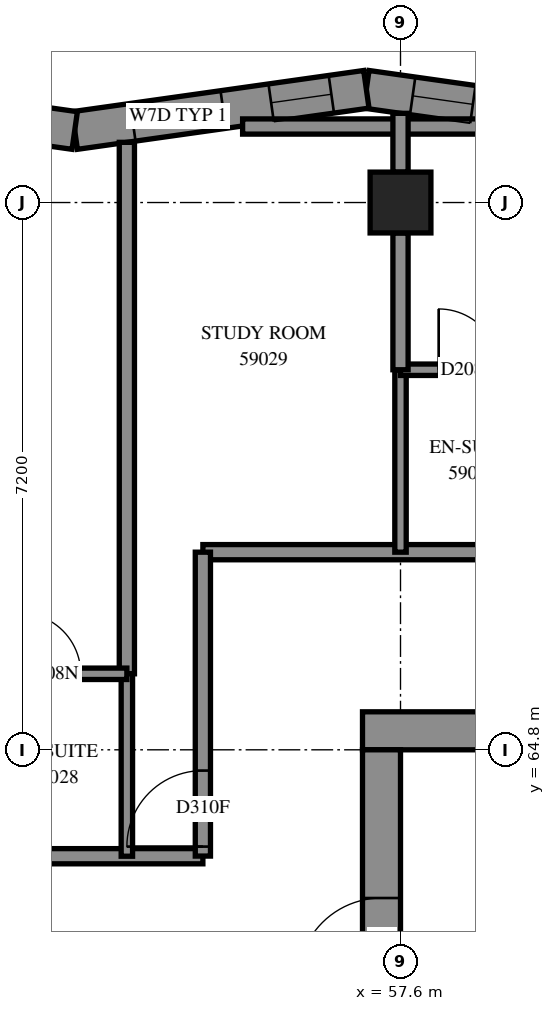
"""IFC4 building model, lengths in metres.
Left out: names, types, materials, properties, quantities, classifications, styles, units other than length and angle.
Written with IfcOpenShell. Run it as: python <this file> out.ifc"""

import sys

from ifc_helpers import new_model, si_unit, direction, frame, frame_2d, origin, origin_2d, place, context, subcontext, project, spatial, polyline, rectangle, outline, extrude, element, fill, save


model = new_model("IFC4")
c1 = context("Model", 3, precision=1e-05, world=origin(), true_north=direction((0.0, 1.0)))
c2 = subcontext(c1, "Body", "Model", "MODEL_VIEW")
j1 = project(units=[si_unit("LENGTHUNIT", "METRE"), si_unit("PLANEANGLEUNIT", "RADIAN")], contexts=[c1])
p1 = place(None, origin())
s1 = spatial("IfcSite", under=j1, at=p1, CompositionType="ELEMENT")
p2 = place(p1, origin())
s2 = spatial("IfcBuilding", under=s1, at=p2, CompositionType="ELEMENT")
p3 = place(p2, frame((0.0, 0.0, 216.8)))
s3 = spatial("IfcBuildingStorey", under=s2, at=p3, CompositionType="ELEMENT", Elevation=216.8)
p4 = place(p3, frame((57.6, 72.0, 0.0), z_axis=(0.0, 0.0, 1.0), x_axis=(1.0, 0.0, 0.0)))
e1 = element("IfcColumn", 1, at=p4, inside=s3, PredefinedType="COLUMN", context=c2, shape_type="SweptSolid", body=[
    extrude(rectangle(XDim=0.8, YDim=0.8, at=origin_2d()), origin(), (0.0, 0.0, 1.0), 3.1),
])
p5 = place(p3, frame((57.1, 65.05, -0.3), z_axis=(0.0, 0.0, 1.0), x_axis=(1.0, 0.0, 0.0)))
e2 = element("IfcWall", 2, at=p5, inside=s3, PredefinedType="SHEAR", context=c2, shape_type="SweptSolid", body=[
    extrude(rectangle(XDim=15.4, YDim=0.5, at=frame_2d((7.7, 0.0))), origin(), (0.0, 0.0, 1.0), 2.7),
])
p6 = place(p5, frame((10.5, 0.0, 0.3)))
e3 = element("IfcOpeningElement", 3, at=p6, cuts=e2, PredefinedType="OPENING", context=c2, shape_type="SweptSolid", body=[
    extrude(rectangle(XDim=0.8, YDim=2.1, at=frame_2d((0.4, 1.05))), frame((0.0, 0.26, 0.0), z_axis=(0.0, -1.0, 0.0), x_axis=(1.0, 0.0, 0.0)), (0.0, 0.0, 1.0), 0.52),
])
p7 = place(p3, frame((57.35, 50.4, -0.3), z_axis=(0.0, 0.0, 1.0), x_axis=(0.0, 1.0, 0.0)))
e4 = element("IfcWall", 4, at=p7, inside=s3, PredefinedType="SHEAR", context=c2, shape_type="SweptSolid", body=[
    extrude(rectangle(XDim=14.4, YDim=0.5, at=frame_2d((7.2, 0.0))), origin(), (0.0, 0.0, 1.0), 2.7),
])
p8 = place(p7, frame((4.55, 0.0, 0.3)))
e5 = element("IfcOpeningElement", 5, at=p8, cuts=e4, PredefinedType="OPENING", context=c2, shape_type="SweptSolid", body=[
    extrude(rectangle(XDim=1.1, YDim=2.1, at=frame_2d((0.55, 1.05))), frame((0.0, 0.26, 0.0), z_axis=(0.0, -1.0, 0.0), x_axis=(1.0, 0.0, 0.0)), (0.0, 0.0, 1.0), 0.52),
])
p9 = place(p7, frame((11.35, 0.0, 0.3)))
e6 = element("IfcOpeningElement", 6, at=p9, cuts=e4, PredefinedType="OPENING", context=c2, shape_type="SweptSolid", body=[
    extrude(rectangle(XDim=1.1, YDim=2.1, at=frame_2d((0.55, 1.05))), frame((0.0, 0.26, 0.0), z_axis=(0.0, -1.0, 0.0), x_axis=(1.0, 0.0, 0.0)), (0.0, 0.0, 1.0), 0.52),
])
p10 = place(p3, frame((60.987, 72.948, 0.0), z_axis=(0.0, 0.0, 1.0), x_axis=(-0.9901681853, 0.1398819675, 0.0)))
e7 = element("IfcWall", 7, at=p10, inside=s3, PredefinedType="SOLIDWALL", context=c2, shape_type="SweptSolid", body=[
    extrude(outline(polyline([(0.035, -0.25), (3.91, -0.25), (3.839, 0.25), (-0.035, 0.25), (0.035, -0.25)])), origin(), (0.0, 0.0, 1.0), 3.1),
])
p11 = place(p10, frame((0.41, 0.0, 0.45)))
e8 = element("IfcOpeningElement", 8, at=p11, cuts=e7, PredefinedType="OPENING", context=c2, shape_type="SweptSolid", body=[
    extrude(rectangle(XDim=1.3, YDim=2.5, at=frame_2d((0.65, 1.25))), frame((0.0, 0.26, 0.0), z_axis=(0.0, -1.0, 0.0), x_axis=(1.0, 0.0, 0.0)), (0.0, 0.0, 1.0), 0.52),
])
p12 = place(p10, frame((2.459, 0.0, 0.45)))
e9 = element("IfcOpeningElement", 9, at=p12, cuts=e7, PredefinedType="OPENING", context=c2, shape_type="SweptSolid", body=[
    extrude(rectangle(XDim=0.8, YDim=2.5, at=frame_2d((0.4, 1.25))), frame((0.0, 0.26, 0.0), z_axis=(0.0, -1.0, 0.0), x_axis=(1.0, 0.0, 0.0)), (0.0, 0.0, 1.0), 0.52),
])
p13 = place(p3, frame((57.151, 73.49, 0.0), z_axis=(0.0, 0.0, 1.0), x_axis=(-0.9901676803, -0.1398855422, 0.0)))
e10 = element("IfcWall", 10, at=p13, inside=s3, PredefinedType="SOLIDWALL", context=c2, shape_type="SweptSolid", body=[
    extrude(outline(polyline([(-0.035, -0.25), (3.839, -0.25), (3.91, 0.25), (0.035, 0.25), (-0.035, -0.25)])), origin(), (0.0, 0.0, 1.0), 3.1),
])
p14 = place(p13, frame((0.465, 0.0, 0.45)))
e11 = element("IfcOpeningElement", 11, at=p14, cuts=e10, PredefinedType="OPENING", context=c2, shape_type="SweptSolid", body=[
    extrude(rectangle(XDim=0.8, YDim=2.5, at=frame_2d((0.4, 1.25))), frame((0.0, 0.26, 0.0), z_axis=(0.0, -1.0, 0.0), x_axis=(1.0, 0.0, 0.0)), (0.0, 0.0, 1.0), 0.52),
])
p15 = place(p13, frame((1.902, 0.0, 0.5)))
e12 = element("IfcOpeningElement", 12, at=p15, cuts=e10, PredefinedType="OPENING", context=c2, shape_type="SweptSolid", body=[
    extrude(rectangle(XDim=1.2, YDim=2.45, at=frame_2d((0.6, 1.225))), frame((0.0, 0.26, 0.0), z_axis=(0.0, -1.0, 0.0), x_axis=(1.0, 0.0, 0.0)), (0.0, 0.0, 1.0), 0.52),
])
p16 = place(p3, frame((53.314, 72.948, 0.0), z_axis=(0.0, 0.0, 1.0), x_axis=(-0.9901681853, 0.1398819675, 0.0)))
e13 = element("IfcWall", 13, at=p16, inside=s3, PredefinedType="SOLIDWALL", context=c2, shape_type="SweptSolid", body=[
    extrude(outline(polyline([(0.035, -0.25), (3.91, -0.25), (3.839, 0.25), (-0.035, 0.25), (0.035, -0.25)])), origin(), (0.0, 0.0, 1.0), 3.1),
])
p17 = place(p16, frame((0.872, 0.0, 0.45)))
e14 = element("IfcOpeningElement", 14, at=p17, cuts=e13, PredefinedType="OPENING", context=c2, shape_type="SweptSolid", body=[
    extrude(rectangle(XDim=1.2, YDim=2.5, at=frame_2d((0.6, 1.25))), frame((0.0, 0.26, 0.0), z_axis=(0.0, -1.0, 0.0), x_axis=(1.0, 0.0, 0.0)), (0.0, 0.0, 1.0), 0.52),
])
p18 = place(p3, frame((55.0, 67.4, 0.0), z_axis=(0.0, 0.0, 1.0), x_axis=(1.0, 0.0, 0.0)))
e15 = element("IfcWall", 15, at=p18, inside=s3, PredefinedType="PARTITIONING", context=c2, shape_type="SweptSolid", body=[
    extrude(rectangle(XDim=19.6, YDim=0.2, at=frame_2d((9.8, 0.0))), origin(), (0.0, 0.0, 1.0), 3.1),
])
p19 = place(p18, frame((4.9, 0.0, 0.0)))
e16 = element("IfcOpeningElement", 16, at=p19, cuts=e15, PredefinedType="OPENING", context=c2, shape_type="SweptSolid", body=[
    extrude(rectangle(XDim=0.9, YDim=2.1, at=frame_2d((0.45, 1.05))), frame((0.0, 0.11, 0.0), z_axis=(0.0, -1.0, 0.0), x_axis=(1.0, 0.0, 0.0)), (0.0, 0.0, 1.0), 0.22),
])
p20 = place(p18, frame((8.539, 0.0, 0.0)))
e17 = element("IfcOpeningElement", 17, at=p20, cuts=e15, PredefinedType="OPENING", context=c2, shape_type="SweptSolid", body=[
    extrude(rectangle(XDim=0.9, YDim=2.1, at=frame_2d((0.45, 1.05))), frame((0.0, 0.11, 0.0), z_axis=(0.0, -1.0, 0.0), x_axis=(1.0, 0.0, 0.0)), (0.0, 0.0, 1.0), 0.22),
])
p21 = place(p18, frame((13.8, 0.0, 0.0)))
e18 = element("IfcOpeningElement", 18, at=p21, cuts=e15, PredefinedType="OPENING", context=c2, shape_type="SweptSolid", body=[
    extrude(rectangle(XDim=0.9, YDim=2.1, at=frame_2d((0.45, 1.05))), frame((0.0, 0.11, 0.0), z_axis=(0.0, -1.0, 0.0), x_axis=(1.0, 0.0, 0.0)), (0.0, 0.0, 1.0), 0.22),
])
p22 = place(p3, frame((40.602, 63.4, 0.0), z_axis=(0.0, 0.0, 1.0), x_axis=(1.0, 0.0, 0.0)))
e19 = element("IfcWall", 19, at=p22, inside=s3, PredefinedType="PARTITIONING", context=c2, shape_type="SweptSolid", body=[
    extrude(rectangle(XDim=14.398, YDim=0.2, at=frame_2d((7.199, 0.0))), origin(), (0.0, 0.0, 1.0), 3.1),
])
p23 = place(p22, frame((0.124, 0.0, 0.0)))
e20 = element("IfcOpeningElement", 20, at=p23, cuts=e19, PredefinedType="OPENING", context=c2, shape_type="SweptSolid", body=[
    extrude(rectangle(XDim=1.0, YDim=2.1, at=frame_2d((0.5, 1.05))), frame((0.0, 0.11, 0.0), z_axis=(0.0, -1.0, 0.0), x_axis=(1.0, 0.0, 0.0)), (0.0, 0.0, 1.0), 0.22),
])
p24 = place(p22, frame((6.46, 0.0, 0.0)))
e21 = element("IfcOpeningElement", 21, at=p24, cuts=e19, PredefinedType="OPENING", context=c2, shape_type="SweptSolid", body=[
    extrude(rectangle(XDim=1.0, YDim=2.1, at=frame_2d((0.5, 1.05))), frame((0.0, 0.11, 0.0), z_axis=(0.0, -1.0, 0.0), x_axis=(1.0, 0.0, 0.0)), (0.0, 0.0, 1.0), 0.22),
])
p25 = place(p22, frame((10.198, 0.0, 0.0)))
e22 = element("IfcOpeningElement", 22, at=p25, cuts=e19, PredefinedType="OPENING", context=c2, shape_type="SweptSolid", body=[
    extrude(rectangle(XDim=0.9, YDim=2.1, at=frame_2d((0.45, 1.05))), frame((0.0, 0.11, 0.0), z_axis=(0.0, -1.0, 0.0), x_axis=(1.0, 0.0, 0.0)), (0.0, 0.0, 1.0), 0.22),
])
p26 = place(p3, frame((54.0, 65.8, 0.0), z_axis=(0.0, 0.0, 1.0), x_axis=(0.0, 1.0, 0.0)))
e23 = element("IfcWall", 23, at=p26, inside=s3, PredefinedType="PARTITIONING", context=c2, shape_type="SweptSolid", body=[
    extrude(rectangle(XDim=6.992, YDim=0.2, at=frame_2d((3.496, 0.0))), origin(), (0.0, 0.0, 1.0), 3.1),
])
p27 = place(p3, frame((55.0, 63.402, 0.0), z_axis=(0.0, 0.0, 1.0), x_axis=(0.0, 1.0, 0.0)))
e24 = element("IfcWall", 24, at=p27, inside=s3, PredefinedType="PARTITIONING", context=c2, shape_type="SweptSolid", body=[
    extrude(rectangle(XDim=3.998, YDim=0.2, at=frame_2d((1.999, 0.0))), origin(), (0.0, 0.0, 1.0), 3.1),
])
p28 = place(p27, frame((0.125, 0.0, 0.0)))
e25 = element("IfcOpeningElement", 25, at=p28, cuts=e24, PredefinedType="OPENING", context=c2, shape_type="SweptSolid", body=[
    extrude(rectangle(XDim=1.0, YDim=2.1, at=frame_2d((0.5, 1.05))), frame((0.0, 0.11, 0.0), z_axis=(0.0, -1.0, 0.0), x_axis=(1.0, 0.0, 0.0)), (0.0, 0.0, 1.0), 0.22),
])
p29 = place(p3, frame((55.523, 73.0, 0.0), z_axis=(0.0, 0.0, 1.0), x_axis=(1.0, 0.0, 0.0)))
e26 = element("IfcWall", 26, at=p29, inside=s3, PredefinedType="PARTITIONING", context=c2, shape_type="SweptSolid", body=[
    extrude(rectangle(XDim=3.256, YDim=0.2, at=frame_2d((1.628, 0.0))), origin(), (0.0, 0.0, 1.0), 3.1),
])
for number, where, z_axis, x_axis in (
    (27, (54.0, 63.4, 0.0), (0.0, 0.0, 1.0), (0.0, 1.0, 0.0)),
    (28, (57.6, 67.4, 0.0), (0.0, 0.0, 1.0), (0.0, 1.0, 0.0)),
):
    element("IfcWall", number, at=place(p3, frame(where, z_axis=z_axis, x_axis=x_axis)), inside=s3, PredefinedType="PARTITIONING", context=c2, shape_type="SweptSolid", body=[
        extrude(rectangle(XDim=2.4, YDim=0.15, at=frame_2d((1.2, 0.0))), origin(), (0.0, 0.0, 1.0), 3.1),
    ])
p30 = place(p3, frame((52.1, 65.8, 0.0), z_axis=(0.0, 0.0, 1.0), x_axis=(1.0, 0.0, 0.0)))
e29 = element("IfcWall", 29, at=p30, inside=s3, PredefinedType="PARTITIONING", context=c2, shape_type="SweptSolid", body=[
    extrude(rectangle(XDim=1.9, YDim=0.15, at=frame_2d((0.95, 0.0))), origin(), (0.0, 0.0, 1.0), 3.1),
])
p31 = place(p30, frame((0.493, 0.0, 0.0)))
e30 = element("IfcOpeningElement", 30, at=p31, cuts=e29, PredefinedType="OPENING", context=c2, shape_type="SweptSolid", body=[
    extrude(rectangle(XDim=0.8, YDim=2.1, at=frame_2d((0.4, 1.05))), frame((0.0, 0.085, 0.0), z_axis=(0.0, -1.0, 0.0), x_axis=(1.0, 0.0, 0.0)), (0.0, 0.0, 1.0), 0.17),
])
p32 = place(p3, frame((57.6, 69.8, 0.0), z_axis=(0.0, 0.0, 1.0), x_axis=(1.0, 0.0, 0.0)))
e31 = element("IfcWall", 31, at=p32, inside=s3, PredefinedType="PARTITIONING", context=c2, shape_type="SweptSolid", body=[
    extrude(rectangle(XDim=1.9, YDim=0.15, at=frame_2d((0.95, 0.0))), origin(), (0.0, 0.0, 1.0), 3.1),
])
p33 = place(p32, frame((0.502, 0.0, 0.0)))
e32 = element("IfcOpeningElement", 32, at=p33, cuts=e31, PredefinedType="OPENING", context=c2, shape_type="SweptSolid", body=[
    extrude(rectangle(XDim=0.8, YDim=2.1, at=frame_2d((0.4, 1.05))), frame((0.0, 0.085, 0.0), z_axis=(0.0, -1.0, 0.0), x_axis=(1.0, 0.0, 0.0)), (0.0, 0.0, 1.0), 0.17),
])
p34 = place(p3, frame((57.6, 69.8, 0.0), z_axis=(0.0, 0.0, 1.0), x_axis=(0.0, 1.0, 0.0)))
e33 = element("IfcWall", 33, at=p34, inside=s3, PredefinedType="PARTITIONING", context=c2, shape_type="SweptSolid", body=[
    extrude(rectangle(XDim=1.8, YDim=0.2, at=frame_2d((0.9, 0.0))), origin(), (0.0, 0.0, 1.0), 3.1),
])
p35 = place(p3, frame((57.6, 72.4, 0.0), z_axis=(0.0, 0.0, 1.0), x_axis=(0.0, 1.0, 0.0)))
e34 = element("IfcWall", 34, at=p35, inside=s3, PredefinedType="PARTITIONING", context=c2, shape_type="SweptSolid", body=[
    extrude(rectangle(XDim=0.774, YDim=0.2, at=frame_2d((0.387, 0.0))), origin(), (0.0, 0.0, 1.0), 3.1),
])
p36 = place(p9, origin())
e35 = element("IfcDoor", 35, at=p36, inside=s3, OperationType="SINGLE_SWING_LEFT", PredefinedType="DOOR", context=c2, shape_type="SweptSolid", body=[
    extrude(rectangle(XDim=1.1, YDim=2.1, at=frame_2d((0.55, 1.05))), frame((0.0, 0.025, 0.0), z_axis=(0.0, -1.0, 0.0), x_axis=(1.0, 0.0, 0.0)), (0.0, 0.0, 1.0), 0.05),
])
fill(e6, e35)
p37 = place(p31, origin())
e36 = element("IfcDoor", 36, at=p37, inside=s3, OperationType="SINGLE_SWING_RIGHT", PredefinedType="DOOR", context=c2, shape_type="SweptSolid", body=[
    extrude(rectangle(XDim=0.8, YDim=2.1, at=frame_2d((0.4, 1.05))), frame((0.0, 0.025, 0.0), z_axis=(0.0, -1.0, 0.0), x_axis=(1.0, 0.0, 0.0)), (0.0, 0.0, 1.0), 0.05),
])
fill(e30, e36)
p38 = place(p28, origin())
e37 = element("IfcDoor", 37, at=p38, inside=s3, OperationType="SINGLE_SWING_LEFT", PredefinedType="DOOR", context=c2, shape_type="SweptSolid", body=[
    extrude(rectangle(XDim=1.0, YDim=2.1, at=frame_2d((0.5, 1.05))), frame((0.0, 0.025, 0.0), z_axis=(0.0, -1.0, 0.0), x_axis=(1.0, 0.0, 0.0)), (0.0, 0.0, 1.0), 0.05),
])
fill(e25, e37)
p39 = place(p33, origin())
e38 = element("IfcDoor", 38, at=p39, inside=s3, OperationType="SINGLE_SWING_RIGHT", PredefinedType="DOOR", context=c2, shape_type="SweptSolid", body=[
    extrude(rectangle(XDim=0.8, YDim=2.1, at=frame_2d((0.4, 1.05))), frame((0.0, 0.025, 0.0), z_axis=(0.0, -1.0, 0.0), x_axis=(1.0, 0.0, 0.0)), (0.0, 0.0, 1.0), 0.05),
])
fill(e32, e38)
p40 = place(p14, origin())
e39 = element("IfcWindow", 39, at=p40, inside=s3, PartitioningType="SINGLE_PANEL", PredefinedType="WINDOW", context=c2, shape_type="SweptSolid", body=[
    extrude(rectangle(XDim=0.8, YDim=2.5, at=frame_2d((0.4, 1.25))), frame((0.0, 0.18, 0.0), z_axis=(0.0, -1.0, 0.0), x_axis=(1.0, 0.0, 0.0)), (0.0, 0.0, 1.0), 0.06),
])
fill(e11, e39)
p41 = place(p15, origin())
e40 = element("IfcWindow", 40, at=p41, inside=s3, PartitioningType="SINGLE_PANEL", PredefinedType="WINDOW", context=c2, shape_type="SweptSolid", body=[
    extrude(rectangle(XDim=1.2, YDim=2.45, at=frame_2d((0.6, 1.225))), frame((0.0, 0.18, 0.0), z_axis=(0.0, -1.0, 0.0), x_axis=(1.0, 0.0, 0.0)), (0.0, 0.0, 1.0), 0.06),
])
fill(e12, e40)
p42 = place(p12, origin())
e41 = element("IfcWindow", 41, at=p42, inside=s3, PartitioningType="SINGLE_PANEL", PredefinedType="WINDOW", context=c2, shape_type="SweptSolid", body=[
    extrude(rectangle(XDim=0.8, YDim=2.5, at=frame_2d((0.4, 1.25))), frame((0.0, 0.12, 0.0), z_axis=(0.0, -1.0, 0.0), x_axis=(1.0, 0.0, 0.0)), (0.0, 0.0, 1.0), 0.06),
])
fill(e9, e41)
save(model, sys.argv[1])
